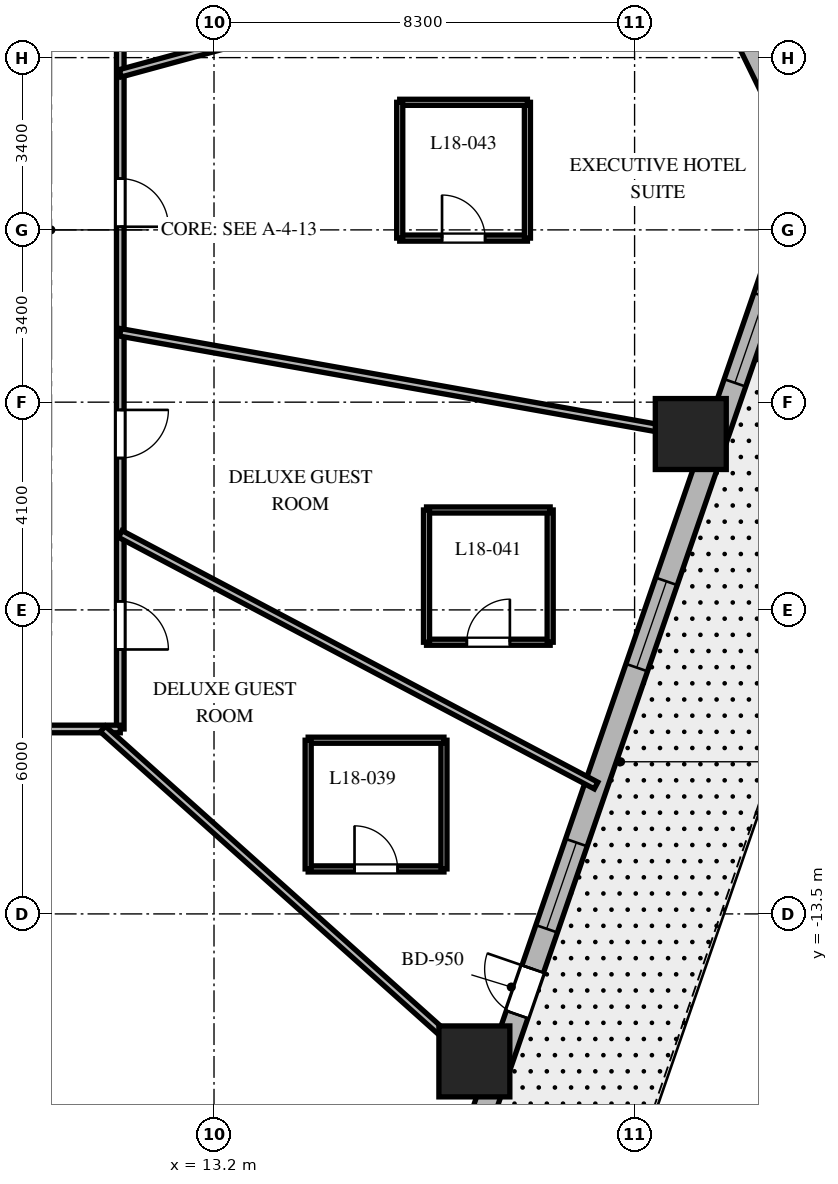
"""IFC4 building model, lengths in metres.
Left out: names, types, materials, properties, quantities, classifications, styles, units other than length and angle.
Written with IfcOpenShell. Run it as: python <this file> out.ifc"""

import sys

from ifc_helpers import new_model, si_unit, direction, frame, frame_2d, origin, origin_2d, place, context, subcontext, project, spatial, rectangle, extrude, element, fill, save


model = new_model("IFC4")
c1 = context("Model", 3, precision=1e-05, world=origin(), true_north=direction((0.0, 1.0)))
c2 = subcontext(c1, "Body", "Model", "MODEL_VIEW")
j1 = project(units=[si_unit("LENGTHUNIT", "METRE"), si_unit("PLANEANGLEUNIT", "RADIAN")], contexts=[c1])
p1 = place(None, origin())
s1 = spatial("IfcSite", under=j1, at=p1, CompositionType="ELEMENT")
p2 = place(p1, origin())
s2 = spatial("IfcBuilding", under=s1, at=p2, CompositionType="ELEMENT")
p3 = place(p2, frame((0.0, 0.0, 78.6)))
s3 = spatial("IfcBuildingStorey", under=s2, at=p3, CompositionType="ELEMENT", Elevation=78.6)
for number, where, z_axis, x_axis in (
    (1, (18.338, -16.411, 0.0), (0.0, 0.0, 1.0), (1.0, 0.0, 0.0)),
    (2, (22.609, -4.029, 0.0), (0.0, 0.0, 1.0), (1.0, 0.0, 0.0)),
):
    element("IfcColumn", number, at=place(p3, frame(where, z_axis=z_axis, x_axis=x_axis)), inside=s3, PredefinedType="COLUMN", context=c2, shape_type="SweptSolid", body=[
        extrude(rectangle(XDim=1.4, YDim=1.4, at=origin_2d()), origin(), (0.0, 0.0, 1.0), 3.7),
    ])
p4 = place(p3, frame((17.39, -20.678, 0.0), z_axis=(0.0, 0.0, 1.0), x_axis=(0.326068018294, 0.945346310854, 0.0)))
e3 = element("IfcWall", 3, at=p4, inside=s3, PredefinedType="SOLIDWALL", context=c2, shape_type="SweptSolid", body=[
    extrude(rectangle(XDim=21.793, YDim=0.45, at=frame_2d((10.896, 0.0))), origin(), (0.0, 0.0, 1.0), 3.4),
])
p5 = place(p4, frame((5.493, 0.0, 0.0)))
e4 = element("IfcOpeningElement", 4, at=p5, cuts=e3, PredefinedType="OPENING", context=c2, shape_type="SweptSolid", body=[
    extrude(rectangle(XDim=0.95, YDim=2.15, at=frame_2d((0.475, 1.075))), frame((0.0, 0.235, 0.0), z_axis=(0.0, -1.0, 0.0), x_axis=(1.0, 0.0, 0.0)), (0.0, 0.0, 1.0), 0.47),
])
p6 = place(p4, frame((1.26, 0.0, 0.8)))
e5 = element("IfcOpeningElement", 5, at=p6, cuts=e3, PredefinedType="OPENING", context=c2, shape_type="SweptSolid", body=[
    extrude(rectangle(XDim=1.8, YDim=1.8, at=frame_2d((0.9, 0.9))), frame((0.0, 0.235, 0.0), z_axis=(0.0, -1.0, 0.0), x_axis=(1.0, 0.0, 0.0)), (0.0, 0.0, 1.0), 0.47),
])
p7 = place(p4, frame((7.283, 0.0, 0.8)))
e6 = element("IfcOpeningElement", 6, at=p7, cuts=e3, PredefinedType="OPENING", context=c2, shape_type="SweptSolid", body=[
    extrude(rectangle(XDim=1.8, YDim=1.8, at=frame_2d((0.9, 0.9))), frame((0.0, 0.235, 0.0), z_axis=(0.0, -1.0, 0.0), x_axis=(1.0, 0.0, 0.0)), (0.0, 0.0, 1.0), 0.47),
])
p8 = place(p4, frame((12.736, 0.0, 0.8)))
e7 = element("IfcOpeningElement", 7, at=p8, cuts=e3, PredefinedType="OPENING", context=c2, shape_type="SweptSolid", body=[
    extrude(rectangle(XDim=1.8, YDim=1.8, at=frame_2d((0.9, 0.9))), frame((0.0, 0.235, 0.0), z_axis=(0.0, -1.0, 0.0), x_axis=(1.0, 0.0, 0.0)), (0.0, 0.0, 1.0), 0.47),
])
p9 = place(p4, frame((18.68, 0.0, 0.8)))
e8 = element("IfcOpeningElement", 8, at=p9, cuts=e3, PredefinedType="OPENING", context=c2, shape_type="SweptSolid", body=[
    extrude(rectangle(XDim=1.8, YDim=1.8, at=frame_2d((0.9, 0.9))), frame((0.0, 0.235, 0.0), z_axis=(0.0, -1.0, 0.0), x_axis=(1.0, 0.0, 0.0)), (0.0, 0.0, 1.0), 0.47),
])
p10 = place(p3, frame((24.336, 2.532, 0.0), z_axis=(0.0, 0.0, 1.0), x_axis=(-0.438931326393, 0.898520612291, 0.0)))
e9 = element("IfcWall", 9, at=p10, inside=s3, PredefinedType="SOLIDWALL", context=c2, shape_type="SweptSolid", body=[
    extrude(rectangle(XDim=20.623, YDim=0.45, at=frame_2d((10.312, 0.0))), origin(), (0.0, 0.0, 1.0), 3.4),
])
p11 = place(p10, frame((5.171, 0.0, 0.0)))
e10 = element("IfcOpeningElement", 10, at=p11, cuts=e9, PredefinedType="OPENING", context=c2, shape_type="SweptSolid", body=[
    extrude(rectangle(XDim=1.0, YDim=2.15, at=frame_2d((0.5, 1.075))), frame((0.0, 0.235, 0.0), z_axis=(0.0, -1.0, 0.0), x_axis=(1.0, 0.0, 0.0)), (0.0, 0.0, 1.0), 0.47),
])
p12 = place(p10, frame((6.842, 0.0, 0.8)))
e11 = element("IfcOpeningElement", 11, at=p12, cuts=e9, PredefinedType="OPENING", context=c2, shape_type="SweptSolid", body=[
    extrude(rectangle(XDim=1.8, YDim=1.8, at=frame_2d((0.9, 0.9))), frame((0.0, 0.235, 0.0), z_axis=(0.0, -1.0, 0.0), x_axis=(1.0, 0.0, 0.0)), (0.0, 0.0, 1.0), 0.47),
])
p13 = place(p10, frame((12.683, 0.0, 0.8)))
e12 = element("IfcOpeningElement", 12, at=p13, cuts=e9, PredefinedType="OPENING", context=c2, shape_type="SweptSolid", body=[
    extrude(rectangle(XDim=1.8, YDim=1.8, at=frame_2d((0.9, 0.9))), frame((0.0, 0.235, 0.0), z_axis=(0.0, -1.0, 0.0), x_axis=(1.0, 0.0, 0.0)), (0.0, 0.0, 1.0), 0.47),
])
p14 = place(p10, frame((17.66, 0.0, 0.8)))
e13 = element("IfcOpeningElement", 13, at=p14, cuts=e9, PredefinedType="OPENING", context=c2, shape_type="SweptSolid", body=[
    extrude(rectangle(XDim=1.8, YDim=1.8, at=frame_2d((0.9, 0.9))), frame((0.0, 0.235, 0.0), z_axis=(0.0, -1.0, 0.0), x_axis=(1.0, 0.0, 0.0)), (0.0, 0.0, 1.0), 0.47),
])
p15 = place(p10, frame((1.214, 0.0, 0.8)))
e14 = element("IfcOpeningElement", 14, at=p15, cuts=e9, PredefinedType="OPENING", context=c2, shape_type="SweptSolid", body=[
    extrude(rectangle(XDim=1.8, YDim=1.8, at=frame_2d((0.9, 0.9))), frame((0.0, 0.235, 0.0), z_axis=(0.0, -1.0, 0.0), x_axis=(1.0, 0.0, 0.0)), (0.0, 0.0, 1.0), 0.47),
])
p16 = place(p3, frame((11.35, 9.85, 0.0), z_axis=(0.0, 0.0, 1.0), x_axis=(0.0, -1.0, 0.0)))
e15 = element("IfcWall", 15, at=p16, inside=s3, PredefinedType="PARTITIONING", context=c2, shape_type="SweptSolid", body=[
    extrude(rectangle(XDim=19.7, YDim=0.15, at=frame_2d((9.85, 0.0))), origin(), (0.0, 0.0, 1.0), 2.84),
])
p17 = place(p16, frame((4.208, 0.0, 0.0)))
e16 = element("IfcOpeningElement", 16, at=p17, cuts=e15, PredefinedType="OPENING", context=c2, shape_type="SweptSolid", body=[
    extrude(rectangle(XDim=0.95, YDim=2.03, at=frame_2d((0.475, 1.015))), frame((0.0, 0.085, 0.0), z_axis=(0.0, -1.0, 0.0), x_axis=(1.0, 0.0, 0.0)), (0.0, 0.0, 1.0), 0.17),
])
p18 = place(p16, frame((0.97, 0.0, 0.0)))
e17 = element("IfcOpeningElement", 17, at=p18, cuts=e15, PredefinedType="OPENING", context=c2, shape_type="SweptSolid", body=[
    extrude(rectangle(XDim=0.95, YDim=2.03, at=frame_2d((0.475, 1.015))), frame((0.0, 0.085, 0.0), z_axis=(0.0, -1.0, 0.0), x_axis=(1.0, 0.0, 0.0)), (0.0, 0.0, 1.0), 0.17),
])
p19 = place(p16, frame((17.181, 0.0, 0.0)))
e18 = element("IfcOpeningElement", 18, at=p19, cuts=e15, PredefinedType="OPENING", context=c2, shape_type="SweptSolid", body=[
    extrude(rectangle(XDim=0.95, YDim=2.03, at=frame_2d((0.475, 1.015))), frame((0.0, 0.085, 0.0), z_axis=(0.0, -1.0, 0.0), x_axis=(1.0, 0.0, 0.0)), (0.0, 0.0, 1.0), 0.17),
])
p20 = place(p16, frame((13.403, 0.0, 0.0)))
e19 = element("IfcOpeningElement", 19, at=p20, cuts=e15, PredefinedType="OPENING", context=c2, shape_type="SweptSolid", body=[
    extrude(rectangle(XDim=0.95, YDim=2.03, at=frame_2d((0.475, 1.015))), frame((0.0, 0.085, 0.0), z_axis=(0.0, -1.0, 0.0), x_axis=(1.0, 0.0, 0.0)), (0.0, 0.0, 1.0), 0.17),
])
p21 = place(p16, frame((8.838, 0.0, 0.0)))
e20 = element("IfcOpeningElement", 20, at=p21, cuts=e15, PredefinedType="OPENING", context=c2, shape_type="SweptSolid", body=[
    extrude(rectangle(XDim=0.95, YDim=2.03, at=frame_2d((0.475, 1.015))), frame((0.0, 0.085, 0.0), z_axis=(0.0, -1.0, 0.0), x_axis=(1.0, 0.0, 0.0)), (0.0, 0.0, 1.0), 0.17),
])
p22 = place(p3, frame((11.35, -9.85, 0.0), z_axis=(0.0, 0.0, 1.0), x_axis=(-1.0, 0.0, 0.0)))
e21 = element("IfcWall", 21, at=p22, inside=s3, PredefinedType="PARTITIONING", context=c2, shape_type="SweptSolid", body=[
    extrude(rectangle(XDim=22.7, YDim=0.15, at=frame_2d((11.35, 0.0))), origin(), (0.0, 0.0, 1.0), 2.84),
])
p23 = place(p22, frame((18.837, 0.0, 0.0)))
e22 = element("IfcOpeningElement", 22, at=p23, cuts=e21, PredefinedType="OPENING", context=c2, shape_type="SweptSolid", body=[
    extrude(rectangle(XDim=0.9, YDim=2.03, at=frame_2d((0.45, 1.015))), frame((0.0, 0.085, 0.0), z_axis=(0.0, -1.0, 0.0), x_axis=(1.0, 0.0, 0.0)), (0.0, 0.0, 1.0), 0.17),
])
p24 = place(p22, frame((15.532, 0.0, 0.0)))
e23 = element("IfcOpeningElement", 23, at=p24, cuts=e21, PredefinedType="OPENING", context=c2, shape_type="SweptSolid", body=[
    extrude(rectangle(XDim=0.95, YDim=2.03, at=frame_2d((0.475, 1.015))), frame((0.0, 0.085, 0.0), z_axis=(0.0, -1.0, 0.0), x_axis=(1.0, 0.0, 0.0)), (0.0, 0.0, 1.0), 0.17),
])
p25 = place(p22, frame((10.444, 0.0, 0.0)))
e24 = element("IfcOpeningElement", 24, at=p25, cuts=e21, PredefinedType="OPENING", context=c2, shape_type="SweptSolid", body=[
    extrude(rectangle(XDim=0.95, YDim=2.03, at=frame_2d((0.475, 1.015))), frame((0.0, 0.085, 0.0), z_axis=(0.0, -1.0, 0.0), x_axis=(1.0, 0.0, 0.0)), (0.0, 0.0, 1.0), 0.17),
])
p26 = place(p22, frame((3.369, 0.0, 0.0)))
e25 = element("IfcOpeningElement", 25, at=p26, cuts=e21, PredefinedType="OPENING", context=c2, shape_type="SweptSolid", body=[
    extrude(rectangle(XDim=0.95, YDim=2.03, at=frame_2d((0.475, 1.015))), frame((0.0, 0.085, 0.0), z_axis=(0.0, -1.0, 0.0), x_axis=(1.0, 0.0, 0.0)), (0.0, 0.0, 1.0), 0.17),
])
p27 = place(p3, frame((11.35, 3.091, 0.0), z_axis=(0.0, 0.0, 1.0), x_axis=(0.964859685283, 0.262765651704, 0.0)))
e26 = element("IfcWall", 26, at=p27, inside=s3, PredefinedType="PARTITIONING", context=c2, shape_type="SweptSolid", body=[
    extrude(rectangle(XDim=11.629, YDim=0.15, at=frame_2d((5.814, 0.0))), origin(), (0.0, 0.0, 1.0), 2.54),
])
p28 = place(p3, frame((11.007, -9.85, 0.0), z_axis=(0.0, 0.0, 1.0), x_axis=(0.745177305978, -0.666866390407, 0.0)))
e27 = element("IfcWall", 27, at=p28, inside=s3, PredefinedType="PARTITIONING", context=c2, shape_type="SweptSolid", body=[
    extrude(rectangle(XDim=10.375, YDim=0.15, at=frame_2d((5.188, 0.0))), origin(), (0.0, 0.0, 1.0), 2.54),
])
p29 = place(p3, frame((11.35, -6.001, 0.0), z_axis=(0.0, 0.0, 1.0), x_axis=(0.884022077319, -0.467445148453, 0.0)))
e28 = element("IfcWall", 28, at=p29, inside=s3, PredefinedType="PARTITIONING", context=c2, shape_type="SweptSolid", body=[
    extrude(rectangle(XDim=10.621, YDim=0.15, at=frame_2d((5.311, 0.0))), origin(), (0.0, 0.0, 1.0), 2.54),
])
p30 = place(p3, frame((11.35, -2.023, 0.0), z_axis=(0.0, 0.0, 1.0), x_axis=(0.984493741877, -0.17541970301, 0.0)))
e29 = element("IfcWall", 29, at=p30, inside=s3, PredefinedType="PARTITIONING", context=c2, shape_type="SweptSolid", body=[
    extrude(rectangle(XDim=11.937, YDim=0.15, at=frame_2d((5.969, 0.0))), origin(), (0.0, 0.0, 1.0), 2.54),
])
p31 = place(p3, frame((15.058, -12.612, 0.0), z_axis=(0.0, 0.0, 1.0), x_axis=(1.0, 0.0, 0.0)))
e30 = element("IfcWall", 30, at=p31, inside=s3, PredefinedType="PARTITIONING", context=c2, shape_type="SweptSolid", body=[
    extrude(rectangle(XDim=2.68, YDim=0.12, at=frame_2d((1.34, 0.0))), origin(), (0.0, 0.0, 1.0), 2.972),
])
p32 = place(p31, frame((0.915, 0.0, 0.0)))
e31 = element("IfcOpeningElement", 31, at=p32, cuts=e30, PredefinedType="OPENING", context=c2, shape_type="SweptSolid", body=[
    extrude(rectangle(XDim=0.85, YDim=2.03, at=frame_2d((0.425, 1.015))), frame((0.0, 0.07, 0.0), z_axis=(0.0, -1.0, 0.0), x_axis=(1.0, 0.0, 0.0)), (0.0, 0.0, 1.0), 0.14),
])
p33 = place(p3, frame((17.738, -12.612, 0.0), z_axis=(0.0, 0.0, 1.0), x_axis=(0.0, 1.0, 0.0)))
e32 = element("IfcWall", 32, at=p33, inside=s3, PredefinedType="PARTITIONING", context=c2, shape_type="SweptSolid", body=[
    extrude(rectangle(XDim=2.54, YDim=0.12, at=frame_2d((1.27, 0.0))), origin(), (0.0, 0.0, 1.0), 3.4),
])
p34 = place(p3, frame((17.738, -10.072, 0.0), z_axis=(0.0, 0.0, 1.0), x_axis=(-1.0, 0.0, 0.0)))
e33 = element("IfcWall", 33, at=p34, inside=s3, PredefinedType="PARTITIONING", context=c2, shape_type="SweptSolid", body=[
    extrude(rectangle(XDim=2.68, YDim=0.12, at=frame_2d((1.34, 0.0))), origin(), (0.0, 0.0, 1.0), 2.972),
])
p35 = place(p3, frame((15.058, -10.072, 0.0), z_axis=(0.0, 0.0, 1.0), x_axis=(0.0, -1.0, 0.0)))
e34 = element("IfcWall", 34, at=p35, inside=s3, PredefinedType="PARTITIONING", context=c2, shape_type="SweptSolid", body=[
    extrude(rectangle(XDim=2.54, YDim=0.12, at=frame_2d((1.27, 0.0))), origin(), (0.0, 0.0, 1.0), 3.4),
])
p36 = place(p3, frame((17.394, -8.138, 0.0), z_axis=(0.0, 0.0, 1.0), x_axis=(1.0, 0.0, 0.0)))
e35 = element("IfcWall", 35, at=p36, inside=s3, PredefinedType="PARTITIONING", context=c2, shape_type="SweptSolid", body=[
    extrude(rectangle(XDim=2.44, YDim=0.12, at=frame_2d((1.22, 0.0))), origin(), (0.0, 0.0, 1.0), 3.4),
])
p37 = place(p36, frame((0.795, 0.0, 0.0)))
e36 = element("IfcOpeningElement", 36, at=p37, cuts=e35, PredefinedType="OPENING", context=c2, shape_type="SweptSolid", body=[
    extrude(rectangle(XDim=0.85, YDim=2.03, at=frame_2d((0.425, 1.015))), frame((0.0, 0.07, 0.0), z_axis=(0.0, -1.0, 0.0), x_axis=(1.0, 0.0, 0.0)), (0.0, 0.0, 1.0), 0.14),
])
p38 = place(p3, frame((19.834, -8.138, 0.0), z_axis=(0.0, 0.0, 1.0), x_axis=(0.0, 1.0, 0.0)))
e37 = element("IfcWall", 37, at=p38, inside=s3, PredefinedType="PARTITIONING", context=c2, shape_type="SweptSolid", body=[
    extrude(rectangle(XDim=2.61, YDim=0.12, at=frame_2d((1.305, 0.0))), origin(), (0.0, 0.0, 1.0), 3.4),
])
p39 = place(p3, frame((19.834, -5.528, 0.0), z_axis=(0.0, 0.0, 1.0), x_axis=(-1.0, 0.0, 0.0)))
e38 = element("IfcWall", 38, at=p39, inside=s3, PredefinedType="PARTITIONING", context=c2, shape_type="SweptSolid", body=[
    extrude(rectangle(XDim=2.44, YDim=0.12, at=frame_2d((1.22, 0.0))), origin(), (0.0, 0.0, 1.0), 2.84),
])
p40 = place(p3, frame((17.394, -5.528, 0.0), z_axis=(0.0, 0.0, 1.0), x_axis=(0.0, -1.0, 0.0)))
e39 = element("IfcWall", 39, at=p40, inside=s3, PredefinedType="PARTITIONING", context=c2, shape_type="SweptSolid", body=[
    extrude(rectangle(XDim=2.61, YDim=0.12, at=frame_2d((1.305, 0.0))), origin(), (0.0, 0.0, 1.0), 2.972),
])
p41 = place(p3, frame((16.865, -0.162, 0.0), z_axis=(0.0, 0.0, 1.0), x_axis=(1.0, 0.0, 0.0)))
e40 = element("IfcWall", 40, at=p41, inside=s3, PredefinedType="PARTITIONING", context=c2, shape_type="SweptSolid", body=[
    extrude(rectangle(XDim=2.52, YDim=0.12, at=frame_2d((1.26, 0.0))), origin(), (0.0, 0.0, 1.0), 2.84),
])
p42 = place(p41, frame((0.835, 0.0, 0.0)))
e41 = element("IfcOpeningElement", 41, at=p42, cuts=e40, PredefinedType="OPENING", context=c2, shape_type="SweptSolid", body=[
    extrude(rectangle(XDim=0.85, YDim=2.03, at=frame_2d((0.425, 1.015))), frame((0.0, 0.07, 0.0), z_axis=(0.0, -1.0, 0.0), x_axis=(1.0, 0.0, 0.0)), (0.0, 0.0, 1.0), 0.14),
])
p43 = place(p3, frame((19.385, -0.162, 0.0), z_axis=(0.0, 0.0, 1.0), x_axis=(0.0, 1.0, 0.0)))
e42 = element("IfcWall", 42, at=p43, inside=s3, PredefinedType="PARTITIONING", context=c2, shape_type="SweptSolid", body=[
    extrude(rectangle(XDim=2.68, YDim=0.12, at=frame_2d((1.34, 0.0))), origin(), (0.0, 0.0, 1.0), 3.4),
])
p44 = place(p3, frame((19.385, 2.518, 0.0), z_axis=(0.0, 0.0, 1.0), x_axis=(-1.0, 0.0, 0.0)))
e43 = element("IfcWall", 43, at=p44, inside=s3, PredefinedType="PARTITIONING", context=c2, shape_type="SweptSolid", body=[
    extrude(rectangle(XDim=2.52, YDim=0.12, at=frame_2d((1.26, 0.0))), origin(), (0.0, 0.0, 1.0), 2.84),
])
p45 = place(p3, frame((16.865, 2.518, 0.0), z_axis=(0.0, 0.0, 1.0), x_axis=(0.0, -1.0, 0.0)))
e44 = element("IfcWall", 44, at=p45, inside=s3, PredefinedType="PARTITIONING", context=c2, shape_type="SweptSolid", body=[
    extrude(rectangle(XDim=2.68, YDim=0.12, at=frame_2d((1.34, 0.0))), origin(), (0.0, 0.0, 1.0), 3.4),
])
p46 = place(p5, origin())
e45 = element("IfcDoor", 45, at=p46, inside=s3, OperationType="SINGLE_SWING_RIGHT", PredefinedType="DOOR", context=c2, shape_type="SweptSolid", body=[
    extrude(rectangle(XDim=0.95, YDim=2.15, at=frame_2d((0.475, 1.075))), frame((0.0, 0.025, 0.0), z_axis=(0.0, -1.0, 0.0), x_axis=(1.0, 0.0, 0.0)), (0.0, 0.0, 1.0), 0.05),
])
fill(e4, e45)
p47 = place(p7, origin())
e46 = element("IfcWindow", 46, at=p47, inside=s3, PartitioningType="SINGLE_PANEL", PredefinedType="WINDOW", context=c2, shape_type="SweptSolid", body=[
    extrude(rectangle(XDim=1.8, YDim=1.8, at=frame_2d((0.9, 0.9))), frame((0.0, 0.03, 0.0), z_axis=(0.0, -1.0, 0.0), x_axis=(1.0, 0.0, 0.0)), (0.0, 0.0, 1.0), 0.06),
])
fill(e6, e46)
p48 = place(p8, origin())
e47 = element("IfcWindow", 47, at=p48, inside=s3, PartitioningType="SINGLE_PANEL", PredefinedType="WINDOW", context=c2, shape_type="SweptSolid", body=[
    extrude(rectangle(XDim=1.8, YDim=1.8, at=frame_2d((0.9, 0.9))), frame((0.0, 0.03, 0.0), z_axis=(0.0, -1.0, 0.0), x_axis=(1.0, 0.0, 0.0)), (0.0, 0.0, 1.0), 0.06),
])
fill(e7, e47)
p49 = place(p9, origin())
e48 = element("IfcWindow", 48, at=p49, inside=s3, PartitioningType="SINGLE_PANEL", PredefinedType="WINDOW", context=c2, shape_type="SweptSolid", body=[
    extrude(rectangle(XDim=1.8, YDim=1.8, at=frame_2d((0.9, 0.9))), frame((0.0, 0.03, 0.0), z_axis=(0.0, -1.0, 0.0), x_axis=(1.0, 0.0, 0.0)), (0.0, 0.0, 1.0), 0.06),
])
fill(e8, e48)
p50 = place(p19, origin())
e49 = element("IfcDoor", 49, at=p50, inside=s3, OperationType="SINGLE_SWING_RIGHT", PredefinedType="DOOR", context=c2, shape_type="SweptSolid", body=[
    extrude(rectangle(XDim=0.95, YDim=2.03, at=frame_2d((0.475, 1.015))), frame((0.0, 0.025, 0.0), z_axis=(0.0, -1.0, 0.0), x_axis=(1.0, 0.0, 0.0)), (0.0, 0.0, 1.0), 0.05),
])
fill(e18, e49)
p51 = place(p32, origin())
e50 = element("IfcDoor", 50, at=p51, inside=s3, OperationType="SINGLE_SWING_LEFT", PredefinedType="DOOR", context=c2, shape_type="SweptSolid", body=[
    extrude(rectangle(XDim=0.85, YDim=2.03, at=frame_2d((0.425, 1.015))), frame((0.0, 0.025, 0.0), z_axis=(0.0, -1.0, 0.0), x_axis=(1.0, 0.0, 0.0)), (0.0, 0.0, 1.0), 0.05),
])
fill(e31, e50)
p52 = place(p20, origin())
e51 = element("IfcDoor", 51, at=p52, inside=s3, OperationType="SINGLE_SWING_LEFT", PredefinedType="DOOR", context=c2, shape_type="SweptSolid", body=[
    extrude(rectangle(XDim=0.95, YDim=2.03, at=frame_2d((0.475, 1.015))), frame((0.0, 0.025, 0.0), z_axis=(0.0, -1.0, 0.0), x_axis=(1.0, 0.0, 0.0)), (0.0, 0.0, 1.0), 0.05),
])
fill(e19, e51)
p53 = place(p37, origin())
e52 = element("IfcDoor", 52, at=p53, inside=s3, OperationType="SINGLE_SWING_RIGHT", PredefinedType="DOOR", context=c2, shape_type="SweptSolid", body=[
    extrude(rectangle(XDim=0.85, YDim=2.03, at=frame_2d((0.425, 1.015))), frame((0.0, 0.025, 0.0), z_axis=(0.0, -1.0, 0.0), x_axis=(1.0, 0.0, 0.0)), (0.0, 0.0, 1.0), 0.05),
])
fill(e36, e52)
p54 = place(p21, origin())
e53 = element("IfcDoor", 53, at=p54, inside=s3, OperationType="SINGLE_SWING_RIGHT", PredefinedType="DOOR", context=c2, shape_type="SweptSolid", body=[
    extrude(rectangle(XDim=0.95, YDim=2.03, at=frame_2d((0.475, 1.015))), frame((0.0, 0.025, 0.0), z_axis=(0.0, -1.0, 0.0), x_axis=(1.0, 0.0, 0.0)), (0.0, 0.0, 1.0), 0.05),
])
fill(e20, e53)
p55 = place(p42, origin())
e54 = element("IfcDoor", 54, at=p55, inside=s3, OperationType="SINGLE_SWING_LEFT", PredefinedType="DOOR", context=c2, shape_type="SweptSolid", body=[
    extrude(rectangle(XDim=0.85, YDim=2.03, at=frame_2d((0.425, 1.015))), frame((0.0, 0.025, 0.0), z_axis=(0.0, -1.0, 0.0), x_axis=(1.0, 0.0, 0.0)), (0.0, 0.0, 1.0), 0.05),
])
fill(e41, e54)
save(model, sys.argv[1])
